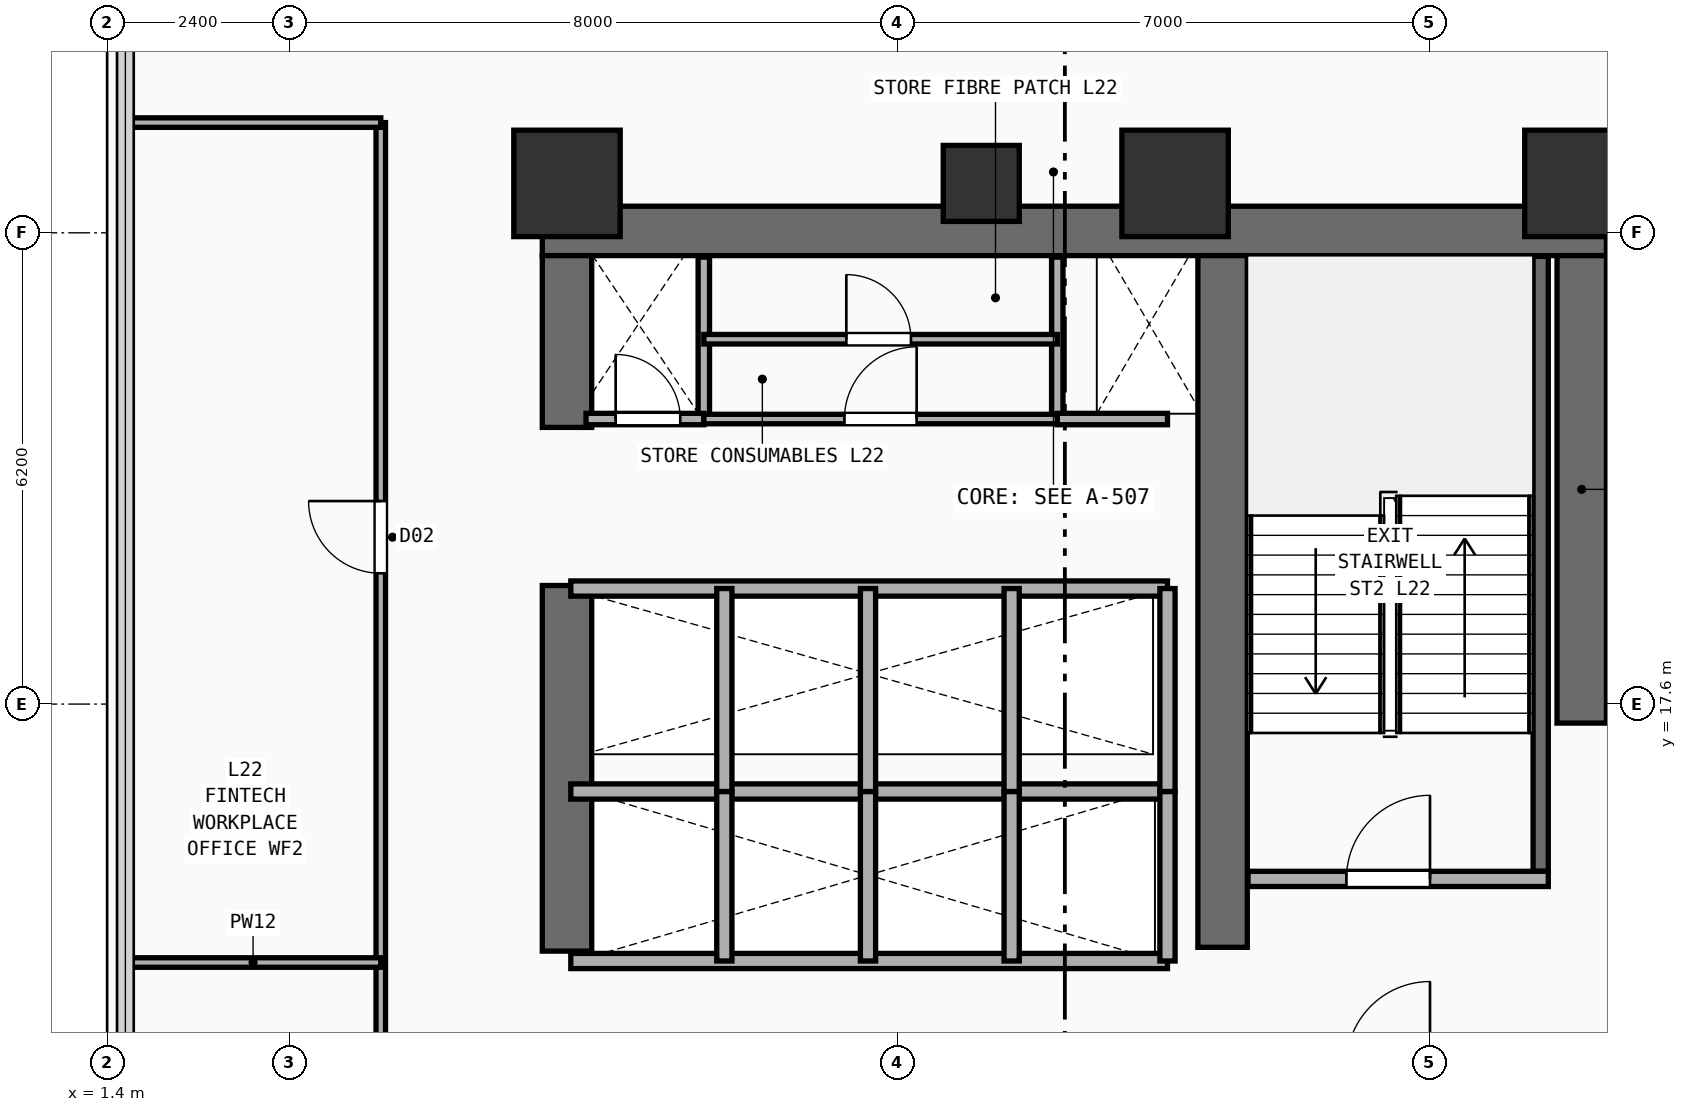
"""IFC4 building model, lengths in metres.
Left out: names, types, materials, properties, quantities, classifications, styles, units other than length and angle.
Written with IfcOpenShell. Run it as: python <this file> out.ifc"""

import sys

from ifc_helpers import new_model, si_unit, direction, frame, frame_2d, origin, origin_2d, place, context, subcontext, project, spatial, rectangle, extrude, element, fill, save


model = new_model("IFC4")
c1 = context("Model", 3, precision=1e-05, world=origin(), true_north=direction((0.0, 1.0)))
c2 = subcontext(c1, "Body", "Model", "MODEL_VIEW")
j1 = project(units=[si_unit("LENGTHUNIT", "METRE"), si_unit("PLANEANGLEUNIT", "RADIAN")], contexts=[c1])
p1 = place(None, origin())
s1 = spatial("IfcSite", under=j1, at=p1, CompositionType="ELEMENT")
p2 = place(p1, origin())
s2 = spatial("IfcBuilding", under=s1, at=p2, CompositionType="ELEMENT")
p3 = place(p2, frame((0.0, 0.0, 87.9)))
s3 = spatial("IfcBuildingStorey", under=s2, at=p3, CompositionType="ELEMENT", Elevation=87.9)
p4 = place(p3, frame((7.125, 23.825, 0.0), z_axis=(0.0, 0.0, 1.0), x_axis=(1.0, 0.0, 0.0)))
e1 = element("IfcWall", 1, at=p4, inside=s3, PredefinedType="SHEAR", context=c2, shape_type="SweptSolid", body=[
    extrude(rectangle(XDim=14.0, YDim=0.65, at=frame_2d((7.0, 0.0))), origin(), (0.0, 0.0, 1.0), 3.54),
])
p5 = place(p3, frame((7.45, 14.35, 0.0), z_axis=(0.0, 0.0, 1.0), x_axis=(0.0, 1.0, 0.0)))
e2 = element("IfcWall", 2, at=p5, inside=s3, PredefinedType="SHEAR", context=c2, shape_type="SweptSolid", body=[
    extrude(rectangle(XDim=4.81, YDim=0.65, at=frame_2d((2.405, 0.0))), origin(), (0.0, 0.0, 1.0), 3.54),
])
p6 = place(p3, frame((7.45, 21.24, 0.0), z_axis=(0.0, 0.0, 1.0), x_axis=(0.0, 1.0, 0.0)))
e3 = element("IfcWall", 3, at=p6, inside=s3, PredefinedType="SHEAR", context=c2, shape_type="SweptSolid", body=[
    extrude(rectangle(XDim=2.26, YDim=0.65, at=frame_2d((1.13, 0.0))), origin(), (0.0, 0.0, 1.0), 3.54),
])
p7 = place(p3, frame((20.8, 17.35, 0.0), z_axis=(0.0, 0.0, 1.0), x_axis=(0.0, 1.0, 0.0)))
e4 = element("IfcWall", 4, at=p7, inside=s3, PredefinedType="SHEAR", context=c2, shape_type="SweptSolid", body=[
    extrude(rectangle(XDim=6.15, YDim=0.65, at=frame_2d((3.075, 0.0))), origin(), (0.0, 0.0, 1.0), 3.54),
])
p8 = place(p3, frame((16.075, 14.4, 0.0), z_axis=(0.0, 0.0, 1.0), x_axis=(0.0, 1.0, 0.0)))
e5 = element("IfcWall", 5, at=p8, inside=s3, PredefinedType="SHEAR", context=c2, shape_type="SweptSolid", body=[
    extrude(rectangle(XDim=9.1, YDim=0.65, at=frame_2d((4.55, 0.0))), origin(), (0.0, 0.0, 1.0), 3.54),
])
for number, where, z_axis, x_axis in (
    (6, (7.45, 24.45, 0.0), (0.0, 0.0, 1.0), (1.0, 0.0, 0.0)),
    (7, (15.45, 24.45, 0.0), (0.0, 0.0, 1.0), (1.0, 0.0, 0.0)),
    (8, (20.75, 24.45, 0.0), (0.0, 0.0, 1.0), (1.0, 0.0, 0.0)),
):
    element("IfcColumn", number, at=place(p3, frame(where, z_axis=z_axis, x_axis=x_axis)), inside=s3, PredefinedType="COLUMN", context=c2, shape_type="SweptSolid", body=[
        extrude(rectangle(XDim=1.4, YDim=1.4, at=origin_2d()), origin(), (0.0, 0.0, 1.0), 3.54),
    ])
p9 = place(p3, frame((12.9, 24.45, 0.0), z_axis=(0.0, 0.0, 1.0), x_axis=(1.0, 0.0, 0.0)))
e9 = element("IfcColumn", 9, at=p9, inside=s3, PredefinedType="COLUMN", context=c2, shape_type="SweptSolid", body=[
    extrude(rectangle(XDim=1.0, YDim=1.0, at=origin_2d()), origin(), (0.0, 0.0, 1.0), 3.54),
])
p10 = place(p3, frame((20.26, 15.4, 0.0), z_axis=(0.0, 0.0, 1.0), x_axis=(0.0, 1.0, 0.0)))
e10 = element("IfcWall", 10, at=p10, inside=s3, PredefinedType="SHEAR", context=c2, shape_type="SweptSolid", body=[
    extrude(rectangle(XDim=8.09, YDim=0.2, at=frame_2d((4.045, 0.0))), origin(), (0.0, 0.0, 1.0), 3.54),
])
p11 = place(p3, frame((16.41, 15.3, 0.0), z_axis=(0.0, 0.0, 1.0), x_axis=(1.0, 0.0, 0.0)))
e11 = element("IfcWall", 11, at=p11, inside=s3, PredefinedType="PARTITIONING", context=c2, shape_type="SweptSolid", body=[
    extrude(rectangle(XDim=3.95, YDim=0.2, at=frame_2d((1.975, 0.0))), origin(), (0.0, 0.0, 1.0), 3.54),
])
p12 = place(p11, frame((1.294, 0.0, 0.0)))
e12 = element("IfcOpeningElement", 12, at=p12, cuts=e11, PredefinedType="OPENING", context=c2, shape_type="SweptSolid", body=[
    extrude(rectangle(XDim=1.1, YDim=2.2, at=frame_2d((0.55, 1.1))), frame((0.0, 0.11, 0.0), z_axis=(0.0, -1.0, 0.0), x_axis=(1.0, 0.0, 0.0)), (0.0, 0.0, 1.0), 0.22),
])
for number, where, z_axis, x_axis in (
    (13, (7.5, 14.22, 0.0), (0.0, 0.0, 1.0), (1.0, 0.0, 0.0)),
    (14, (7.5, 16.45, 0.0), (0.0, 0.0, 1.0), (1.0, 0.0, 0.0)),
):
    element("IfcWall", number, at=place(p3, frame(where, z_axis=z_axis, x_axis=x_axis)), inside=s3, PredefinedType="PARTITIONING", context=c2, shape_type="SweptSolid", body=[
        extrude(rectangle(XDim=7.85, YDim=0.2, at=frame_2d((3.925, 0.0))), origin(), (0.0, 0.0, 1.0), 3.54),
    ])
for number, where, z_axis, x_axis in (
    (15, (15.35, 14.22, 0.0), (0.0, 0.0, 1.0), (0.0, 1.0, 0.0)),
    (16, (9.52, 14.22, 0.0), (0.0, 0.0, 1.0), (0.0, 1.0, 0.0)),
    (17, (11.41, 14.22, 0.0), (0.0, 0.0, 1.0), (0.0, 1.0, 0.0)),
    (18, (13.3, 14.22, 0.0), (0.0, 0.0, 1.0), (0.0, 1.0, 0.0)),
):
    element("IfcWall", number, at=place(p3, frame(where, z_axis=z_axis, x_axis=x_axis)), inside=s3, PredefinedType="PARTITIONING", context=c2, shape_type="SweptSolid", body=[
        extrude(rectangle(XDim=2.23, YDim=0.2, at=frame_2d((1.115, 0.0))), origin(), (0.0, 0.0, 1.0), 3.54),
    ])
p13 = place(p3, frame((7.5, 19.12, 0.0), z_axis=(0.0, 0.0, 1.0), x_axis=(1.0, 0.0, 0.0)))
e19 = element("IfcWall", 19, at=p13, inside=s3, PredefinedType="PARTITIONING", context=c2, shape_type="SweptSolid", body=[
    extrude(rectangle(XDim=7.85, YDim=0.2, at=frame_2d((3.925, 0.0))), origin(), (0.0, 0.0, 1.0), 3.54),
])
for number, where, z_axis, x_axis in (
    (20, (15.35, 16.45, 0.0), (0.0, 0.0, 1.0), (0.0, 1.0, 0.0)),
    (21, (9.52, 16.45, 0.0), (0.0, 0.0, 1.0), (0.0, 1.0, 0.0)),
    (22, (11.41, 16.45, 0.0), (0.0, 0.0, 1.0), (0.0, 1.0, 0.0)),
    (23, (13.3, 16.45, 0.0), (0.0, 0.0, 1.0), (0.0, 1.0, 0.0)),
):
    element("IfcWall", number, at=place(p3, frame(where, z_axis=z_axis, x_axis=x_axis)), inside=s3, PredefinedType="PARTITIONING", context=c2, shape_type="SweptSolid", body=[
        extrude(rectangle(XDim=2.67, YDim=0.2, at=frame_2d((1.335, 0.0))), origin(), (0.0, 0.0, 1.0), 3.54),
    ])
for number, where, z_axis, x_axis in (
    (24, (9.25, 21.35, 0.0), (0.0, 0.0, 1.0), (0.0, 1.0, 0.0)),
    (25, (13.9, 21.35, 0.0), (0.0, 0.0, 1.0), (0.0, 1.0, 0.0)),
):
    element("IfcWall", number, at=place(p3, frame(where, z_axis=z_axis, x_axis=x_axis)), inside=s3, PredefinedType="PARTITIONING", context=c2, shape_type="SweptSolid", body=[
        extrude(rectangle(XDim=2.13, YDim=0.15, at=frame_2d((1.065, 0.0))), origin(), (0.0, 0.0, 1.0), 3.54),
    ])
p14 = place(p3, frame((7.7, 21.35, 0.0), z_axis=(0.0, 0.0, 1.0), x_axis=(1.0, 0.0, 0.0)))
e26 = element("IfcWall", 26, at=p14, inside=s3, PredefinedType="PARTITIONING", context=c2, shape_type="SweptSolid", body=[
    extrude(rectangle(XDim=1.55, YDim=0.15, at=frame_2d((0.775, 0.0))), origin(), (0.0, 0.0, 1.0), 3.54),
])
p15 = place(p14, frame((0.39, 0.0, 0.0)))
e27 = element("IfcOpeningElement", 27, at=p15, cuts=e26, PredefinedType="OPENING", context=c2, shape_type="SweptSolid", body=[
    extrude(rectangle(XDim=0.85, YDim=2.15, at=frame_2d((0.425, 1.075))), frame((0.0, 0.085, 0.0), z_axis=(0.0, -1.0, 0.0), x_axis=(1.0, 0.0, 0.0)), (0.0, 0.0, 1.0), 0.17),
])
p16 = place(p3, frame((13.9, 21.35, 0.0), z_axis=(0.0, 0.0, 1.0), x_axis=(1.0, 0.0, 0.0)))
e28 = element("IfcWall", 28, at=p16, inside=s3, PredefinedType="PARTITIONING", context=c2, shape_type="SweptSolid", body=[
    extrude(rectangle(XDim=1.45, YDim=0.15, at=frame_2d((0.725, 0.0))), origin(), (0.0, 0.0, 1.0), 3.54),
])
p17 = place(p3, frame((9.25, 21.35, 0.0), z_axis=(0.0, 0.0, 1.0), x_axis=(1.0, 0.0, 0.0)))
e29 = element("IfcWall", 29, at=p17, inside=s3, PredefinedType="PARTITIONING", context=c2, shape_type="SweptSolid", body=[
    extrude(rectangle(XDim=4.65, YDim=0.125, at=frame_2d((2.325, 0.0))), origin(), (0.0, 0.0, 1.0), 3.54),
])
p18 = place(p17, frame((1.85, 0.0, 0.0)))
e30 = element("IfcOpeningElement", 30, at=p18, cuts=e29, PredefinedType="OPENING", context=c2, shape_type="SweptSolid", body=[
    extrude(rectangle(XDim=0.95, YDim=2.15, at=frame_2d((0.475, 1.075))), frame((0.0, 0.073, 0.0), z_axis=(0.0, -1.0, 0.0), x_axis=(1.0, 0.0, 0.0)), (0.0, 0.0, 1.0), 0.145),
])
p19 = place(p3, frame((9.25, 22.4, 0.0), z_axis=(0.0, 0.0, 1.0), x_axis=(1.0, 0.0, 0.0)))
e31 = element("IfcWall", 31, at=p19, inside=s3, PredefinedType="PARTITIONING", context=c2, shape_type="SweptSolid", body=[
    extrude(rectangle(XDim=4.65, YDim=0.125, at=frame_2d((2.325, 0.0))), origin(), (0.0, 0.0, 1.0), 3.54),
])
p20 = place(p19, frame((1.875, 0.0, 0.0)))
e32 = element("IfcOpeningElement", 32, at=p20, cuts=e31, PredefinedType="OPENING", context=c2, shape_type="SweptSolid", body=[
    extrude(rectangle(XDim=0.85, YDim=2.15, at=frame_2d((0.425, 1.075))), frame((0.0, 0.073, 0.0), z_axis=(0.0, -1.0, 0.0), x_axis=(1.0, 0.0, 0.0)), (0.0, 0.0, 1.0), 0.145),
])
p21 = place(p3, frame((5.0, 7.5, 0.0), z_axis=(0.0, 0.0, 1.0), x_axis=(0.0, 1.0, 0.0)))
e33 = element("IfcWall", 33, at=p21, inside=s3, PredefinedType="PARTITIONING", context=c2, shape_type="SweptSolid", body=[
    extrude(rectangle(XDim=17.75, YDim=0.125, at=frame_2d((8.875, 0.0))), origin(), (0.0, 0.0, 1.0), 3.54),
])
p22 = place(p21, frame((2.85, 0.0, 0.0)))
e34 = element("IfcOpeningElement", 34, at=p22, cuts=e33, PredefinedType="OPENING", context=c2, shape_type="SweptSolid", body=[
    extrude(rectangle(XDim=0.95, YDim=2.15, at=frame_2d((0.475, 1.075))), frame((0.0, 0.073, 0.0), z_axis=(0.0, -1.0, 0.0), x_axis=(1.0, 0.0, 0.0)), (0.0, 0.0, 1.0), 0.145),
])
p23 = place(p21, frame((11.821, 0.0, 0.0)))
e35 = element("IfcOpeningElement", 35, at=p23, cuts=e33, PredefinedType="OPENING", context=c2, shape_type="SweptSolid", body=[
    extrude(rectangle(XDim=0.95, YDim=2.15, at=frame_2d((0.475, 1.075))), frame((0.0, 0.073, 0.0), z_axis=(0.0, -1.0, 0.0), x_axis=(1.0, 0.0, 0.0)), (0.0, 0.0, 1.0), 0.145),
])
for number, where, z_axis, x_axis in (
    (36, (1.64, 25.25, 0.0), (0.0, 0.0, 1.0), (1.0, 0.0, 0.0)),
    (37, (1.64, 14.2, 0.0), (0.0, 0.0, 1.0), (1.0, 0.0, 0.0)),
):
    element("IfcWall", number, at=place(p3, frame(where, z_axis=z_axis, x_axis=x_axis)), inside=s3, PredefinedType="PARTITIONING", context=c2, shape_type="SweptSolid", body=[
        extrude(rectangle(XDim=3.36, YDim=0.125, at=frame_2d((1.68, 0.0))), origin(), (0.0, 0.0, 1.0), 3.54),
    ])
p24 = place(p12, origin())
e38 = element("IfcDoor", 38, at=p24, inside=s3, OperationType="SINGLE_SWING_RIGHT", PredefinedType="DOOR", context=c2, shape_type="SweptSolid", body=[
    extrude(rectangle(XDim=1.1, YDim=2.2, at=frame_2d((0.55, 1.1))), frame((0.0, 0.025, 0.0), z_axis=(0.0, -1.0, 0.0), x_axis=(1.0, 0.0, 0.0)), (0.0, 0.0, 1.0), 0.05),
])
fill(e12, e38)
p25 = place(p15, origin())
e39 = element("IfcDoor", 39, at=p25, inside=s3, OperationType="SINGLE_SWING_LEFT", PredefinedType="DOOR", context=c2, shape_type="SweptSolid", body=[
    extrude(rectangle(XDim=0.85, YDim=2.15, at=frame_2d((0.425, 1.075))), frame((0.0, 0.025, 0.0), z_axis=(0.0, -1.0, 0.0), x_axis=(1.0, 0.0, 0.0)), (0.0, 0.0, 1.0), 0.05),
])
fill(e27, e39)
p26 = place(p18, origin())
e40 = element("IfcDoor", 40, at=p26, inside=s3, OperationType="SINGLE_SWING_RIGHT", PredefinedType="DOOR", context=c2, shape_type="SweptSolid", body=[
    extrude(rectangle(XDim=0.95, YDim=2.15, at=frame_2d((0.475, 1.075))), frame((0.0, 0.025, 0.0), z_axis=(0.0, -1.0, 0.0), x_axis=(1.0, 0.0, 0.0)), (0.0, 0.0, 1.0), 0.05),
])
fill(e30, e40)
p27 = place(p20, origin())
e41 = element("IfcDoor", 41, at=p27, inside=s3, OperationType="SINGLE_SWING_LEFT", PredefinedType="DOOR", context=c2, shape_type="SweptSolid", body=[
    extrude(rectangle(XDim=0.85, YDim=2.15, at=frame_2d((0.425, 1.075))), frame((0.0, 0.025, 0.0), z_axis=(0.0, -1.0, 0.0), x_axis=(1.0, 0.0, 0.0)), (0.0, 0.0, 1.0), 0.05),
])
fill(e32, e41)
p28 = place(p23, origin())
e42 = element("IfcDoor", 42, at=p28, inside=s3, OperationType="SINGLE_SWING_RIGHT", PredefinedType="DOOR", context=c2, shape_type="SweptSolid", body=[
    extrude(rectangle(XDim=0.95, YDim=2.15, at=frame_2d((0.475, 1.075))), frame((0.0, 0.025, 0.0), z_axis=(0.0, -1.0, 0.0), x_axis=(1.0, 0.0, 0.0)), (0.0, 0.0, 1.0), 0.05),
])
fill(e35, e42)
save(model, sys.argv[1])
